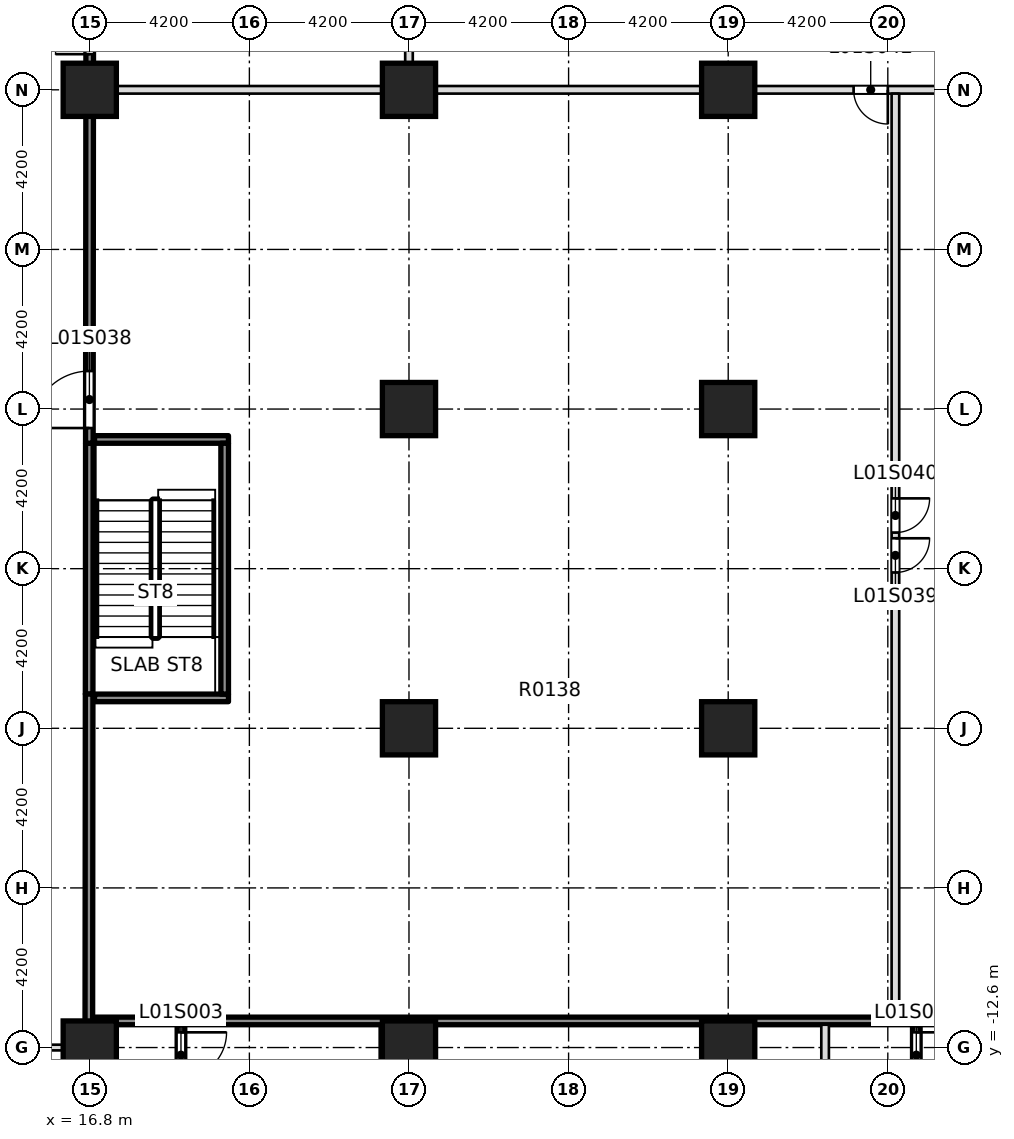
"""IFC4 building model, lengths in metres.
Left out: names, types, materials, properties, quantities, classifications, styles, units other than length and angle.
Written with IfcOpenShell. Run it as: python <this file> out.ifc"""

import sys

from ifc_helpers import new_model, si_unit, direction, frame, frame_2d, origin, origin_2d, place, context, subcontext, project, spatial, rectangle, extrude, element, fill, save


model = new_model("IFC4")
c1 = context("Model", 3, precision=1e-05, world=origin(), true_north=direction((0.0, 1.0)))
c2 = subcontext(c1, "Body", "Model", "MODEL_VIEW")
j1 = project(units=[si_unit("LENGTHUNIT", "METRE"), si_unit("PLANEANGLEUNIT", "RADIAN")], contexts=[c1])
p1 = place(None, origin())
s1 = spatial("IfcSite", under=j1, at=p1, CompositionType="ELEMENT")
p2 = place(p1, origin())
s2 = spatial("IfcBuilding", under=s1, at=p2, CompositionType="ELEMENT")
p3 = place(p2, frame((0.0, 0.0, 7.5)))
s3 = spatial("IfcBuildingStorey", under=s2, at=p3, CompositionType="ELEMENT", Elevation=7.5)
for number, where, z_axis, x_axis in (
    (1, (16.8, -12.6, -0.4), (0.0, 0.0, 1.0), (1.0, 0.0, 0.0)),
    (2, (25.2, -12.6, -0.4), (0.0, 0.0, 1.0), (1.0, 0.0, 0.0)),
    (3, (25.2, -4.2, -0.4), (0.0, 0.0, 1.0), (1.0, 0.0, 0.0)),
    (4, (25.2, 4.2, -0.4), (0.0, 0.0, 1.0), (1.0, 0.0, 0.0)),
    (5, (16.8, 12.6, -0.4), (0.0, 0.0, 1.0), (1.0, 0.0, 0.0)),
    (6, (25.2, 12.6, -0.4), (0.0, 0.0, 1.0), (1.0, 0.0, 0.0)),
):
    element("IfcColumn", number, at=place(p3, frame(where, z_axis=z_axis, x_axis=x_axis)), inside=s3, PredefinedType="COLUMN", context=c2, shape_type="SweptSolid", body=[
        extrude(rectangle(XDim=1.4, YDim=1.4, at=origin_2d()), origin(), (0.0, 0.0, 1.0), 5.0),
    ])
for number, where, z_axis, x_axis in (
    (7, (33.6, -12.6, 0.0), (0.0, 0.0, 1.0), (1.0, 0.0, 0.0)),
    (8, (33.6, -4.2, 0.0), (0.0, 0.0, 1.0), (1.0, 0.0, 0.0)),
    (9, (33.6, 4.2, 0.0), (0.0, 0.0, 1.0), (1.0, 0.0, 0.0)),
    (10, (33.6, 12.6, 0.0), (0.0, 0.0, 1.0), (1.0, 0.0, 0.0)),
):
    element("IfcColumn", number, at=place(p3, frame(where, z_axis=z_axis, x_axis=x_axis)), inside=s3, PredefinedType="COLUMN", context=c2, shape_type="SweptSolid", body=[
        extrude(rectangle(XDim=1.4, YDim=1.4, at=origin_2d()), origin(), (0.0, 0.0, 1.0), 4.6),
    ])
p4 = place(p3, frame((7.275, -12.6, 0.0), z_axis=(0.0, 0.0, 1.0), x_axis=(1.0, 0.0, 0.0)))
e11 = element("IfcWall", 11, at=p4, inside=s3, PredefinedType="PARTITIONING", context=c2, shape_type="SweptSolid", body=[
    extrude(rectangle(XDim=9.625, YDim=0.15, at=frame_2d((4.812, 0.0))), origin(), (0.0, 0.0, 1.0), 4.6),
])
p5 = place(p3, frame((16.875, 12.6, 0.0), z_axis=(0.0, 0.0, 1.0), x_axis=(1.0, 0.0, 0.0)))
e12 = element("IfcWall", 12, at=p5, inside=s3, PredefinedType="PARTITIONING", context=c2, shape_type="SweptSolid", body=[
    extrude(rectangle(XDim=34.075, YDim=0.2, at=frame_2d((17.038, 0.0))), origin(), (0.0, 0.0, 1.0), 4.6),
])
p6 = place(p5, frame((20.025, 0.0, 0.0)))
e13 = element("IfcOpeningElement", 13, at=p6, cuts=e12, PredefinedType="OPENING", context=c2, shape_type="SweptSolid", body=[
    extrude(rectangle(XDim=0.9, YDim=2.1, at=frame_2d((0.45, 1.05))), frame((0.0, 0.11, 0.0), z_axis=(0.0, -1.0, 0.0), x_axis=(1.0, 0.0, 0.0)), (0.0, 0.0, 1.0), 0.22),
])
p7 = place(p3, frame((16.8, -18.125, 0.0), z_axis=(0.0, 0.0, 1.0), x_axis=(0.0, 1.0, 0.0)))
e14 = element("IfcWall", 14, at=p7, inside=s3, PredefinedType="PARTITIONING", context=c2, shape_type="SweptSolid", body=[
    extrude(rectangle(XDim=5.45, YDim=0.2, at=frame_2d((2.725, 0.0))), origin(), (0.0, 0.0, 1.0), 4.6),
])
p8 = place(p3, frame((16.783, -3.3, 0.0), z_axis=(0.0, 0.0, 1.0), x_axis=(0.000924761016, 0.999999572408, 0.0)))
e15 = element("IfcWall", 15, at=p8, inside=s3, PredefinedType="SOLIDWALL", context=c2, shape_type="SweptSolid", body=[
    extrude(rectangle(XDim=6.6, YDim=0.2, at=frame_2d((3.3, 0.0))), origin(), (0.0, 0.0, 1.0), 4.6),
])
p9 = place(p3, frame((19.2, -18.125, 0.0), z_axis=(0.0, 0.0, 1.0), x_axis=(0.0, 1.0, 0.0)))
e16 = element("IfcWall", 16, at=p9, inside=s3, PredefinedType="SOLIDWALL", context=c2, shape_type="SweptSolid", body=[
    extrude(rectangle(XDim=6.125, YDim=0.2, at=frame_2d((3.062, 0.0))), origin(), (0.0, 0.0, 1.0), 4.6),
])
p10 = place(p9, frame((4.725, 0.0, 0.0)))
e17 = element("IfcOpeningElement", 17, at=p10, cuts=e16, PredefinedType="OPENING", context=c2, shape_type="SweptSolid", body=[
    extrude(rectangle(XDim=1.2, YDim=2.1, at=frame_2d((0.6, 1.05))), frame((0.0, 0.11, 0.0), z_axis=(0.0, -1.0, 0.0), x_axis=(1.0, 0.0, 0.0)), (0.0, 0.0, 1.0), 0.22),
])
p11 = place(p3, frame((25.2, -18.125, 0.0), z_axis=(0.0, 0.0, 1.0), x_axis=(0.0, 1.0, 0.0)))
e18 = element("IfcWall", 18, at=p11, inside=s3, PredefinedType="SOLIDWALL", context=c2, shape_type="SweptSolid", body=[
    extrude(rectangle(XDim=6.125, YDim=0.2, at=frame_2d((3.062, 0.0))), origin(), (0.0, 0.0, 1.0), 4.6),
])
p12 = place(p3, frame((25.2, 12.7, 0.0), z_axis=(0.0, 0.0, 1.0), x_axis=(0.0, 1.0, 0.0)))
e19 = element("IfcWall", 19, at=p12, inside=s3, PredefinedType="PARTITIONING", context=c2, shape_type="SweptSolid", body=[
    extrude(rectangle(XDim=8.975, YDim=0.2, at=frame_2d((4.488, 0.0))), origin(), (0.0, 0.0, 1.0), 4.6),
])
for number, where, z_axis, x_axis in (
    (20, (33.75, -18.125, 0.0), (0.0, 0.0, 1.0), (0.0, 1.0, 0.0)),
    (21, (36.15, -18.125, 0.0), (0.0, 0.0, 1.0), (0.0, 1.0, 0.0)),
):
    element("IfcWall", number, at=place(p3, frame(where, z_axis=z_axis, x_axis=x_axis)), inside=s3, PredefinedType="PARTITIONING", context=c2, shape_type="SweptSolid", body=[
        extrude(rectangle(XDim=6.125, YDim=0.2, at=frame_2d((3.062, 0.0))), origin(), (0.0, 0.0, 1.0), 4.6),
    ])
p13 = place(p3, frame((38.0, -11.8, 0.0), z_axis=(0.0, 0.0, 1.0), x_axis=(0.0, 1.0, 0.0)))
e22 = element("IfcWall", 22, at=p13, inside=s3, PredefinedType="PARTITIONING", context=c2, shape_type="SweptSolid", body=[
    extrude(rectangle(XDim=24.3, YDim=0.2, at=frame_2d((12.15, 0.0))), origin(), (0.0, 0.0, 1.0), 4.6),
])
p14 = place(p13, frame((11.7, 0.0, 0.0)))
e23 = element("IfcOpeningElement", 23, at=p14, cuts=e22, PredefinedType="OPENING", context=c2, shape_type="SweptSolid", body=[
    extrude(rectangle(XDim=0.9, YDim=2.1, at=frame_2d((0.45, 1.05))), frame((0.0, 0.11, 0.0), z_axis=(0.0, -1.0, 0.0), x_axis=(1.0, 0.0, 0.0)), (0.0, 0.0, 1.0), 0.22),
])
p15 = place(p13, frame((12.75, 0.0, 0.0)))
e24 = element("IfcOpeningElement", 24, at=p15, cuts=e22, PredefinedType="OPENING", context=c2, shape_type="SweptSolid", body=[
    extrude(rectangle(XDim=0.9, YDim=2.1, at=frame_2d((0.45, 1.05))), frame((0.0, 0.11, 0.0), z_axis=(0.0, -1.0, 0.0), x_axis=(1.0, 0.0, 0.0)), (0.0, 0.0, 1.0), 0.22),
])
p16 = place(p3, frame((38.55, -19.125, 0.0), z_axis=(0.0, 0.0, 1.0), x_axis=(0.0, 1.0, 0.0)))
e25 = element("IfcWall", 25, at=p16, inside=s3, PredefinedType="SOLIDWALL", context=c2, shape_type="SweptSolid", body=[
    extrude(rectangle(XDim=7.125, YDim=0.2, at=frame_2d((3.562, 0.0))), origin(), (0.0, 0.0, 1.0), 4.6),
])
p17 = place(p16, frame((5.725, 0.0, 0.0)))
e26 = element("IfcOpeningElement", 26, at=p17, cuts=e25, PredefinedType="OPENING", context=c2, shape_type="SweptSolid", body=[
    extrude(rectangle(XDim=1.2, YDim=2.1, at=frame_2d((0.6, 1.05))), frame((0.0, 0.11, 0.0), z_axis=(0.0, -1.0, 0.0), x_axis=(1.0, 0.0, 0.0)), (0.0, 0.0, 1.0), 0.22),
])
for number, where, z_axis, x_axis in (
    (27, (16.925, -3.4, 0.0), (0.0, 0.0, 1.0), (1.0, 0.0, 0.0)),
    (28, (16.925, 3.4, 0.0), (0.0, 0.0, 1.0), (1.0, 0.0, 0.0)),
):
    element("IfcWall", number, at=place(p3, frame(where, z_axis=z_axis, x_axis=x_axis)), inside=s3, PredefinedType="SOLIDWALL", context=c2, shape_type="SweptSolid", body=[
        extrude(rectangle(XDim=3.525, YDim=0.2, at=frame_2d((1.762, 0.0))), origin(), (0.0, 0.0, 1.0), 4.6),
    ])
p18 = place(p3, frame((16.875, -11.9, 0.0), z_axis=(0.0, 0.0, 1.0), x_axis=(1.0, 0.0, 0.0)))
e29 = element("IfcWall", 29, at=p18, inside=s3, PredefinedType="SOLIDWALL", context=c2, shape_type="SweptSolid", body=[
    extrude(rectangle(XDim=34.075, YDim=0.2, at=frame_2d((17.038, 0.0))), origin(), (0.0, 0.0, 1.0), 4.6),
])
p19 = place(p3, frame((16.775, -12.525, 0.0), z_axis=(0.0, 0.0, 1.0), x_axis=(0.000873362112, 0.999999618619, 0.0)))
e30 = element("IfcWall", 30, at=p19, inside=s3, PredefinedType="SOLIDWALL", context=c2, shape_type="SweptSolid", body=[
    extrude(rectangle(XDim=9.225, YDim=0.2, at=frame_2d((4.612, 0.0))), origin(), (0.0, 0.0, 1.0), 4.6),
])
p20 = place(p3, frame((16.789, 3.3, 0.0), z_axis=(0.0, 0.0, 1.0), x_axis=(0.000891463876, 0.999999602646, 0.0)))
e31 = element("IfcWall", 31, at=p20, inside=s3, PredefinedType="SOLIDWALL", context=c2, shape_type="SweptSolid", body=[
    extrude(rectangle(XDim=12.05, YDim=0.2, at=frame_2d((6.025, 0.0))), origin(), (0.0, 0.0, 1.0), 4.6),
])
p21 = place(p20, frame((0.4, 0.0, 0.0)))
e32 = element("IfcOpeningElement", 32, at=p21, cuts=e31, PredefinedType="OPENING", context=c2, shape_type="SweptSolid", body=[
    extrude(rectangle(XDim=1.5, YDim=2.1, at=frame_2d((0.75, 1.05))), frame((0.0, 0.11, 0.0), z_axis=(0.0, -1.0, 0.0), x_axis=(1.0, 0.0, 0.0)), (0.0, 0.0, 1.0), 0.22),
])
p22 = place(p20, frame((10.238, 0.0, 0.0)))
e33 = element("IfcOpeningElement", 33, at=p22, cuts=e31, PredefinedType="OPENING", context=c2, shape_type="SweptSolid", body=[
    extrude(rectangle(XDim=0.9, YDim=2.1, at=frame_2d((0.45, 1.05))), frame((0.0, 0.11, 0.0), z_axis=(0.0, -1.0, 0.0), x_axis=(1.0, 0.0, 0.0)), (0.0, 0.0, 1.0), 0.22),
])
p23 = place(p3, frame((20.35, -3.3, 0.0), z_axis=(0.0, 0.0, 1.0), x_axis=(0.0, 1.0, 0.0)))
e34 = element("IfcWall", 34, at=p23, inside=s3, PredefinedType="SOLIDWALL", context=c2, shape_type="SweptSolid", body=[
    extrude(rectangle(XDim=6.6, YDim=0.2, at=frame_2d((3.3, 0.0))), origin(), (0.0, 0.0, 1.0), 4.6),
])
p24 = place(p10, origin())
e35 = element("IfcDoor", 35, at=p24, inside=s3, OperationType="DOUBLE_DOOR_SINGLE_SWING", PredefinedType="DOOR", context=c2, shape_type="SweptSolid", body=[
    extrude(rectangle(XDim=1.2, YDim=2.1, at=frame_2d((0.6, 1.05))), frame((0.0, 0.025, 0.0), z_axis=(0.0, -1.0, 0.0), x_axis=(1.0, 0.0, 0.0)), (0.0, 0.0, 1.0), 0.05),
])
fill(e17, e35)
p25 = place(p17, origin())
e36 = element("IfcDoor", 36, at=p25, inside=s3, OperationType="DOUBLE_DOOR_SINGLE_SWING", PredefinedType="DOOR", context=c2, shape_type="SweptSolid", body=[
    extrude(rectangle(XDim=1.2, YDim=2.1, at=frame_2d((0.6, 1.05))), frame((0.0, 0.025, 0.0), z_axis=(0.0, -1.0, 0.0), x_axis=(1.0, 0.0, 0.0)), (0.0, 0.0, 1.0), 0.05),
])
fill(e26, e36)
p26 = place(p21, origin())
e37 = element("IfcDoor", 37, at=p26, inside=s3, OperationType="DOUBLE_DOOR_SINGLE_SWING", PredefinedType="DOOR", context=c2, shape_type="SweptSolid", body=[
    extrude(rectangle(XDim=1.5, YDim=2.1, at=frame_2d((0.75, 1.05))), frame((0.0, 0.025, 0.0), z_axis=(0.0, -1.0, 0.0), x_axis=(1.0, 0.0, 0.0)), (0.0, 0.0, 1.0), 0.05),
])
fill(e32, e37)
p27 = place(p14, origin())
e38 = element("IfcDoor", 38, at=p27, inside=s3, OperationType="SINGLE_SWING_RIGHT", PredefinedType="DOOR", context=c2, shape_type="SweptSolid", body=[
    extrude(rectangle(XDim=0.9, YDim=2.1, at=frame_2d((0.45, 1.05))), frame((0.0, 0.025, 0.0), z_axis=(0.0, -1.0, 0.0), x_axis=(1.0, 0.0, 0.0)), (0.0, 0.0, 1.0), 0.05),
])
fill(e23, e38)
p28 = place(p15, origin())
e39 = element("IfcDoor", 39, at=p28, inside=s3, OperationType="SINGLE_SWING_RIGHT", PredefinedType="DOOR", context=c2, shape_type="SweptSolid", body=[
    extrude(rectangle(XDim=0.9, YDim=2.1, at=frame_2d((0.45, 1.05))), frame((0.0, 0.025, 0.0), z_axis=(0.0, -1.0, 0.0), x_axis=(1.0, 0.0, 0.0)), (0.0, 0.0, 1.0), 0.05),
])
fill(e24, e39)
p29 = place(p22, origin())
e40 = element("IfcDoor", 40, at=p29, inside=s3, OperationType="SINGLE_SWING_LEFT", PredefinedType="DOOR", context=c2, shape_type="SweptSolid", body=[
    extrude(rectangle(XDim=0.9, YDim=2.1, at=frame_2d((0.45, 1.05))), frame((0.0, 0.025, 0.0), z_axis=(0.0, -1.0, 0.0), x_axis=(1.0, 0.0, 0.0)), (0.0, 0.0, 1.0), 0.05),
])
fill(e33, e40)
p30 = place(p6, origin())
e41 = element("IfcDoor", 41, at=p30, inside=s3, OperationType="SINGLE_SWING_RIGHT", PredefinedType="DOOR", context=c2, shape_type="SweptSolid", body=[
    extrude(rectangle(XDim=0.9, YDim=2.1, at=frame_2d((0.45, 1.05))), frame((0.0, 0.025, 0.0), z_axis=(0.0, -1.0, 0.0), x_axis=(1.0, 0.0, 0.0)), (0.0, 0.0, 1.0), 0.05),
])
fill(e13, e41)
save(model, sys.argv[1])
